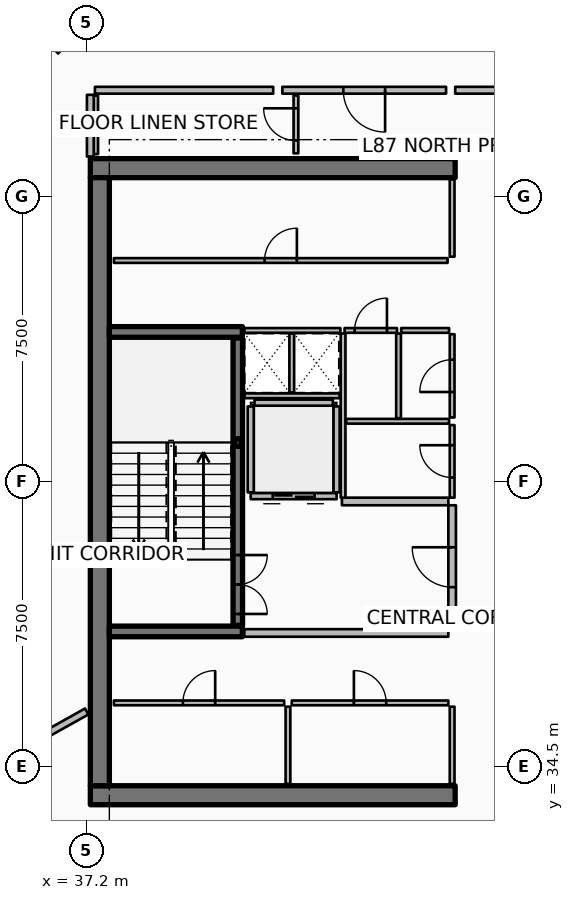
"""IFC4 building model, lengths in metres.
Left out: names, types, materials, properties, quantities, classifications, styles, units other than length and angle.
Written with IfcOpenShell. Run it as: python <this file> out.ifc"""

import sys

from ifc_helpers import new_model, si_unit, direction, frame, frame_2d, origin, origin_2d, place, context, subcontext, project, spatial, rectangle, hollow_rectangle, extrude, element, fill, save


model = new_model("IFC4")
c1 = context("Model", 3, precision=1e-05, world=origin(), true_north=direction((0.0, 1.0)))
c2 = subcontext(c1, "Body", "Model", "MODEL_VIEW")
j1 = project(units=[si_unit("LENGTHUNIT", "METRE"), si_unit("PLANEANGLEUNIT", "RADIAN")], contexts=[c1])
p1 = place(None, origin())
s1 = spatial("IfcSite", under=j1, at=p1, CompositionType="ELEMENT")
p2 = place(p1, origin())
s2 = spatial("IfcBuilding", under=s1, at=p2, CompositionType="ELEMENT")
p3 = place(p2, frame((0.0, 0.0, 347.3)))
s3 = spatial("IfcBuildingStorey", under=s2, at=p3, CompositionType="ELEMENT", Elevation=347.3)
for number, where, z_axis, x_axis in (
    (1, (37.3, 33.75, 0.0), (0.0, 0.0, 1.0), (1.0, 0.0, 0.0)),
    (2, (37.3, 50.25, 0.0), (0.0, 0.0, 1.0), (1.0, 0.0, 0.0)),
):
    element("IfcWall", number, at=place(p3, frame(where, z_axis=z_axis, x_axis=x_axis)), inside=s3, PredefinedType="SHEAR", context=c2, shape_type="SweptSolid", body=[
        extrude(rectangle(XDim=9.6, YDim=0.5, at=frame_2d((4.8, 0.0))), origin(), (0.0, 0.0, 1.0), 4.2),
    ])
p4 = place(p3, frame((37.55, 34.0, 0.0), z_axis=(0.0, 0.0, 1.0), x_axis=(0.0, 1.0, 0.0)))
e3 = element("IfcWall", 3, at=p4, inside=s3, PredefinedType="SHEAR", context=c2, shape_type="SweptSolid", body=[
    extrude(rectangle(XDim=16.0, YDim=0.5, at=frame_2d((8.0, 0.0))), origin(), (0.0, 0.0, 1.0), 4.2),
])
for number, where, z_axis, x_axis in (
    (4, (37.8, 38.06, 0.0), (0.0, 0.0, 1.0), (1.0, 0.0, 0.0)),
    (5, (37.8, 45.94, 0.0), (0.0, 0.0, 1.0), (1.0, 0.0, 0.0)),
):
    element("IfcWall", number, at=place(p3, frame(where, z_axis=z_axis, x_axis=x_axis)), inside=s3, PredefinedType="SHEAR", context=c2, shape_type="SweptSolid", body=[
        extrude(rectangle(XDim=3.5, YDim=0.28, at=frame_2d((1.75, 0.0))), origin(), (0.0, 0.0, 1.0), 4.2),
    ])
p5 = place(p3, frame((41.18, 43.03, 0.0), z_axis=(0.0, 0.0, 1.0), x_axis=(1.0, 0.0, 0.0)))
e6 = element("IfcColumn", 6, at=p5, inside=s3, PredefinedType="COLUMN", context=c2, shape_type="SweptSolid", body=[
    extrude(hollow_rectangle(XDim=0.2, YDim=0.2, WallThickness=0.01, InnerFilletRadius=0.01, OuterFilletRadius=0.02, at=origin_2d()), origin(), (0.0, 0.0, 1.0), 1.895),
])
p6 = place(p3, frame((41.18, 38.22, 0.0), z_axis=(0.0, 0.0, 1.0), x_axis=(0.0, 1.0, 0.0)))
e7 = element("IfcWall", 7, at=p6, inside=s3, PredefinedType="SOLIDWALL", context=c2, shape_type="SweptSolid", body=[
    extrude(rectangle(XDim=7.56, YDim=0.25, at=frame_2d((3.78, 0.0))), origin(), (0.0, 0.0, 1.0), 3.8),
])
p7 = place(p6, frame((0.3, 0.0, 0.0)))
e8 = element("IfcOpeningElement", 8, at=p7, cuts=e7, PredefinedType="OPENING", context=c2, shape_type="SweptSolid", body=[
    extrude(rectangle(XDim=1.55, YDim=2.15, at=frame_2d((0.775, 1.075))), frame((0.0, 0.135, 0.0), z_axis=(0.0, -1.0, 0.0), x_axis=(1.0, 0.0, 0.0)), (0.0, 0.0, 1.0), 0.27),
])
p8 = place(p3, frame((43.78, 41.62, 0.0), z_axis=(0.0, 0.0, 1.0), x_axis=(-1.0, 0.0, 0.0)))
e9 = element("IfcWall", 9, at=p8, inside=s3, PredefinedType="PARTITIONING", context=c2, shape_type="SweptSolid", body=[
    extrude(rectangle(XDim=2.26, YDim=0.16, at=frame_2d((1.13, 0.0))), origin(), (0.0, 0.0, 1.0), 3.8),
])
p9 = place(p8, frame((0.58, 0.0, 0.0)))
e10 = element("IfcOpeningElement", 10, at=p9, cuts=e9, PredefinedType="OPENING", context=c2, shape_type="SweptSolid", body=[
    extrude(rectangle(XDim=1.1, YDim=2.1, at=frame_2d((0.55, 1.05))), frame((0.0, 0.09, 0.0), z_axis=(0.0, -1.0, 0.0), x_axis=(1.0, 0.0, 0.0)), (0.0, 0.0, 1.0), 0.18),
])
for number, where, z_axis, x_axis in (
    (11, (43.78, 41.72, 0.0), (0.0, 0.0, 1.0), (0.0, 1.0, 0.0)),
    (12, (41.52, 41.72, 0.0), (0.0, 0.0, 1.0), (0.0, 1.0, 0.0)),
):
    element("IfcWall", number, at=place(p3, frame(where, z_axis=z_axis, x_axis=x_axis)), inside=s3, PredefinedType="PARTITIONING", context=c2, shape_type="SweptSolid", body=[
        extrude(rectangle(XDim=2.26, YDim=0.16, at=frame_2d((1.13, 0.0))), origin(), (0.0, 0.0, 1.0), 3.8),
    ])
p10 = place(p3, frame((41.62, 44.08, 0.0), z_axis=(0.0, 0.0, 1.0), x_axis=(1.0, 0.0, 0.0)))
e13 = element("IfcWall", 13, at=p10, inside=s3, PredefinedType="PARTITIONING", context=c2, shape_type="SweptSolid", body=[
    extrude(rectangle(XDim=2.06, YDim=0.16, at=frame_2d((1.03, 0.0))), origin(), (0.0, 0.0, 1.0), 3.8),
])
for number, where, z_axis, x_axis in (
    (14, (46.82, 34.05, 0.0), (0.0, 0.0, 1.0), (0.0, 1.0, 0.0)),
    (15, (42.5, 34.05, 0.0), (0.0, 0.0, 1.0), (0.0, 1.0, 0.0)),
):
    element("IfcWall", number, at=place(p3, frame(where, z_axis=z_axis, x_axis=x_axis)), inside=s3, PredefinedType="PARTITIONING", context=c2, shape_type="SweptSolid", body=[
        extrude(rectangle(XDim=2.03, YDim=0.125, at=frame_2d((1.015, 0.0))), origin(), (0.0, 0.0, 1.0), 3.24),
    ])
p11 = place(p3, frame((37.92, 36.18, 0.0), z_axis=(0.0, 0.0, 1.0), x_axis=(1.0, 0.0, 0.0)))
e16 = element("IfcWall", 16, at=p11, inside=s3, PredefinedType="PARTITIONING", context=c2, shape_type="SweptSolid", body=[
    extrude(rectangle(XDim=4.48, YDim=0.125, at=frame_2d((2.24, 0.0))), origin(), (0.0, 0.0, 1.0), 3.24),
])
p12 = place(p11, frame((1.815, 0.0, 0.0)))
e17 = element("IfcOpeningElement", 17, at=p12, cuts=e16, PredefinedType="OPENING", context=c2, shape_type="SweptSolid", body=[
    extrude(rectangle(XDim=0.85, YDim=2.06, at=frame_2d((0.425, 1.03))), frame((0.0, 0.073, 0.0), z_axis=(0.0, -1.0, 0.0), x_axis=(1.0, 0.0, 0.0)), (0.0, 0.0, 1.0), 0.145),
])
p13 = place(p3, frame((42.6, 36.18, 0.0), z_axis=(0.0, 0.0, 1.0), x_axis=(1.0, 0.0, 0.0)))
e18 = element("IfcWall", 18, at=p13, inside=s3, PredefinedType="PARTITIONING", context=c2, shape_type="SweptSolid", body=[
    extrude(rectangle(XDim=4.12, YDim=0.125, at=frame_2d((2.06, 0.0))), origin(), (0.0, 0.0, 1.0), 3.24),
])
p14 = place(p13, frame((1.635, 0.0, 0.0)))
e19 = element("IfcOpeningElement", 19, at=p14, cuts=e18, PredefinedType="OPENING", context=c2, shape_type="SweptSolid", body=[
    extrude(rectangle(XDim=0.85, YDim=2.06, at=frame_2d((0.425, 1.03))), frame((0.0, 0.073, 0.0), z_axis=(0.0, -1.0, 0.0), x_axis=(1.0, 0.0, 0.0)), (0.0, 0.0, 1.0), 0.145),
])
p15 = place(p3, frame((46.82, 47.92, 0.0), z_axis=(0.0, 0.0, 1.0), x_axis=(0.0, 1.0, 0.0)))
e20 = element("IfcWall", 20, at=p15, inside=s3, PredefinedType="PARTITIONING", context=c2, shape_type="SweptSolid", body=[
    extrude(rectangle(XDim=2.03, YDim=0.125, at=frame_2d((1.015, 0.0))), origin(), (0.0, 0.0, 1.0), 3.24),
])
p16 = place(p3, frame((37.92, 47.82, 0.0), z_axis=(0.0, 0.0, 1.0), x_axis=(1.0, 0.0, 0.0)))
e21 = element("IfcWall", 21, at=p16, inside=s3, PredefinedType="PARTITIONING", context=c2, shape_type="SweptSolid", body=[
    extrude(rectangle(XDim=8.78, YDim=0.125, at=frame_2d((4.39, 0.0))), origin(), (0.0, 0.0, 1.0), 3.24),
])
p17 = place(p16, frame((3.965, 0.0, 0.0)))
e22 = element("IfcOpeningElement", 22, at=p17, cuts=e21, PredefinedType="OPENING", context=c2, shape_type="SweptSolid", body=[
    extrude(rectangle(XDim=0.85, YDim=2.06, at=frame_2d((0.425, 1.03))), frame((0.0, 0.073, 0.0), z_axis=(0.0, -1.0, 0.0), x_axis=(1.0, 0.0, 0.0)), (0.0, 0.0, 1.0), 0.145),
])
p18 = place(p3, frame((41.35, 38.02, 0.0), z_axis=(0.0, 0.0, 1.0), x_axis=(1.0, 0.0, 0.0)))
e23 = element("IfcWall", 23, at=p18, inside=s3, PredefinedType="PARTITIONING", context=c2, shape_type="SweptSolid", body=[
    extrude(rectangle(XDim=5.37, YDim=0.2, at=frame_2d((2.685, 0.0))), origin(), (0.0, 0.0, 1.0), 3.8),
])
p19 = place(p3, frame((43.92, 41.48, 0.0), z_axis=(0.0, 0.0, 1.0), x_axis=(1.0, 0.0, 0.0)))
e24 = element("IfcWall", 24, at=p19, inside=s3, PredefinedType="PARTITIONING", context=c2, shape_type="SweptSolid", body=[
    extrude(rectangle(XDim=2.8, YDim=0.2, at=frame_2d((1.4, 0.0))), origin(), (0.0, 0.0, 1.0), 3.8),
])
p20 = place(p3, frame((46.82, 38.12, 0.0), z_axis=(0.0, 0.0, 1.0), x_axis=(0.0, 1.0, 0.0)))
e25 = element("IfcWall", 25, at=p20, inside=s3, PredefinedType="PARTITIONING", context=c2, shape_type="SweptSolid", body=[
    extrude(rectangle(XDim=3.26, YDim=0.2, at=frame_2d((1.63, 0.0))), origin(), (0.0, 0.0, 1.0), 3.8),
])
p21 = place(p20, frame((1.105, 0.0, 0.0)))
e26 = element("IfcOpeningElement", 26, at=p21, cuts=e25, PredefinedType="OPENING", context=c2, shape_type="SweptSolid", body=[
    extrude(rectangle(XDim=1.05, YDim=2.1, at=frame_2d((0.525, 1.05))), frame((0.0, 0.11, 0.0), z_axis=(0.0, -1.0, 0.0), x_axis=(1.0, 0.0, 0.0)), (0.0, 0.0, 1.0), 0.22),
])
p22 = place(p3, frame((41.36, 44.26, 0.0), z_axis=(0.0, 0.0, 1.0), x_axis=(1.0, 0.0, 0.0)))
e27 = element("IfcWall", 27, at=p22, inside=s3, PredefinedType="PARTITIONING", context=c2, shape_type="SweptSolid", body=[
    extrude(rectangle(XDim=2.5, YDim=0.125, at=frame_2d((1.25, 0.0))), origin(), (0.0, 0.0, 1.0), 3.24),
])
p23 = place(p3, frame((42.6, 44.35, 0.0), z_axis=(0.0, 0.0, 1.0), x_axis=(0.0, 1.0, 0.0)))
e28 = element("IfcWall", 28, at=p23, inside=s3, PredefinedType="PARTITIONING", context=c2, shape_type="SweptSolid", body=[
    extrude(rectangle(XDim=1.55, YDim=0.125, at=frame_2d((0.775, 0.0))), origin(), (0.0, 0.0, 1.0), 3.24),
])
p24 = place(p3, frame((43.95, 41.58, 0.0), z_axis=(0.0, 0.0, 1.0), x_axis=(0.0, 1.0, 0.0)))
e29 = element("IfcWall", 29, at=p24, inside=s3, PredefinedType="PARTITIONING", context=c2, shape_type="SweptSolid", body=[
    extrude(rectangle(XDim=4.32, YDim=0.125, at=frame_2d((2.16, 0.0))), origin(), (0.0, 0.0, 1.0), 3.24),
])
p25 = place(p3, frame((44.03, 43.59, 0.0), z_axis=(0.0, 0.0, 1.0), x_axis=(1.0, 0.0, 0.0)))
e30 = element("IfcWall", 30, at=p25, inside=s3, PredefinedType="PARTITIONING", context=c2, shape_type="SweptSolid", body=[
    extrude(rectangle(XDim=2.71, YDim=0.125, at=frame_2d((1.355, 0.0))), origin(), (0.0, 0.0, 1.0), 3.24),
])
p26 = place(p3, frame((45.41, 43.67, 0.0), z_axis=(0.0, 0.0, 1.0), x_axis=(0.0, 1.0, 0.0)))
e31 = element("IfcWall", 31, at=p26, inside=s3, PredefinedType="PARTITIONING", context=c2, shape_type="SweptSolid", body=[
    extrude(rectangle(XDim=2.23, YDim=0.125, at=frame_2d((1.115, 0.0))), origin(), (0.0, 0.0, 1.0), 3.24),
])
p27 = place(p3, frame((46.82, 41.58, 0.0), z_axis=(0.0, 0.0, 1.0), x_axis=(0.0, 1.0, 0.0)))
e32 = element("IfcWall", 32, at=p27, inside=s3, PredefinedType="PARTITIONING", context=c2, shape_type="SweptSolid", body=[
    extrude(rectangle(XDim=1.91, YDim=0.125, at=frame_2d((0.955, 0.0))), origin(), (0.0, 0.0, 1.0), 3.24),
])
p28 = place(p27, frame((0.53, 0.0, 0.0)))
e33 = element("IfcOpeningElement", 33, at=p28, cuts=e32, PredefinedType="OPENING", context=c2, shape_type="SweptSolid", body=[
    extrude(rectangle(XDim=0.85, YDim=2.06, at=frame_2d((0.425, 1.03))), frame((0.0, 0.073, 0.0), z_axis=(0.0, -1.0, 0.0), x_axis=(1.0, 0.0, 0.0)), (0.0, 0.0, 1.0), 0.145),
])
p29 = place(p3, frame((46.82, 43.69, 0.0), z_axis=(0.0, 0.0, 1.0), x_axis=(0.0, 1.0, 0.0)))
e34 = element("IfcWall", 34, at=p29, inside=s3, PredefinedType="PARTITIONING", context=c2, shape_type="SweptSolid", body=[
    extrude(rectangle(XDim=2.19, YDim=0.125, at=frame_2d((1.095, 0.0))), origin(), (0.0, 0.0, 1.0), 3.24),
])
p30 = place(p29, frame((0.67, 0.0, 0.0)))
e35 = element("IfcOpeningElement", 35, at=p30, cuts=e34, PredefinedType="OPENING", context=c2, shape_type="SweptSolid", body=[
    extrude(rectangle(XDim=0.85, YDim=2.06, at=frame_2d((0.425, 1.03))), frame((0.0, 0.073, 0.0), z_axis=(0.0, -1.0, 0.0), x_axis=(1.0, 0.0, 0.0)), (0.0, 0.0, 1.0), 0.145),
])
p31 = place(p3, frame((41.35, 45.98, 0.0), z_axis=(0.0, 0.0, 1.0), x_axis=(1.0, 0.0, 0.0)))
e36 = element("IfcWall", 36, at=p31, inside=s3, PredefinedType="PARTITIONING", context=c2, shape_type="SweptSolid", body=[
    extrude(rectangle(XDim=2.53, YDim=0.125, at=frame_2d((1.265, 0.0))), origin(), (0.0, 0.0, 1.0), 3.24),
])
p32 = place(p3, frame((43.99, 45.98, 0.0), z_axis=(0.0, 0.0, 1.0), x_axis=(1.0, 0.0, 0.0)))
e37 = element("IfcWall", 37, at=p32, inside=s3, PredefinedType="PARTITIONING", context=c2, shape_type="SweptSolid", body=[
    extrude(rectangle(XDim=1.38, YDim=0.125, at=frame_2d((0.69, 0.0))), origin(), (0.0, 0.0, 1.0), 3.24),
])
p33 = place(p32, frame((0.265, 0.0, 0.0)))
e38 = element("IfcOpeningElement", 38, at=p33, cuts=e37, PredefinedType="OPENING", context=c2, shape_type="SweptSolid", body=[
    extrude(rectangle(XDim=0.85, YDim=2.06, at=frame_2d((0.425, 1.03))), frame((0.0, 0.073, 0.0), z_axis=(0.0, -1.0, 0.0), x_axis=(1.0, 0.0, 0.0)), (0.0, 0.0, 1.0), 0.145),
])
p34 = place(p3, frame((45.48, 45.98, 0.0), z_axis=(0.0, 0.0, 1.0), x_axis=(1.0, 0.0, 0.0)))
e39 = element("IfcWall", 39, at=p34, inside=s3, PredefinedType="PARTITIONING", context=c2, shape_type="SweptSolid", body=[
    extrude(rectangle(XDim=1.26, YDim=0.125, at=frame_2d((0.63, 0.0))), origin(), (0.0, 0.0, 1.0), 3.24),
])
p35 = place(p3, frame((37.44, 50.62, 0.0), z_axis=(0.0, 0.0, 1.0), x_axis=(0.0, 1.0, 0.0)))
e40 = element("IfcWall", 40, at=p35, inside=s3, PredefinedType="PARTITIONING", context=c2, shape_type="SweptSolid", body=[
    extrude(rectangle(XDim=1.54, YDim=0.125, at=frame_2d((0.77, 0.0))), origin(), (0.0, 0.0, 1.0), 2.757),
])
p36 = place(p3, frame((42.71, 50.64, 0.0), z_axis=(0.0, 0.0, 1.0), x_axis=(0.0, 1.0, 0.0)))
e41 = element("IfcWall", 41, at=p36, inside=s3, PredefinedType="PARTITIONING", context=c2, shape_type="SweptSolid", body=[
    extrude(rectangle(XDim=1.52, YDim=0.125, at=frame_2d((0.76, 0.0))), origin(), (0.0, 0.0, 1.0), 2.757),
])
p37 = place(p36, frame((0.335, 0.0, 0.0)))
e42 = element("IfcOpeningElement", 42, at=p37, cuts=e41, PredefinedType="OPENING", context=c2, shape_type="SweptSolid", body=[
    extrude(rectangle(XDim=0.85, YDim=2.06, at=frame_2d((0.425, 1.03))), frame((0.0, 0.073, 0.0), z_axis=(0.0, -1.0, 0.0), x_axis=(1.0, 0.0, 0.0)), (0.0, 0.0, 1.0), 0.145),
])
p38 = place(p3, frame((37.204, 35.954, 0.0), z_axis=(0.0, 0.0, 1.0), x_axis=(-0.872495191914, -0.488622697064, 0.0)))
e43 = element("IfcWall", 43, at=p38, inside=s3, PredefinedType="PARTITIONING", context=c2, shape_type="SweptSolid", body=[
    extrude(rectangle(XDim=13.462, YDim=0.18, at=frame_2d((6.731, 0.0))), origin(), (0.0, 0.0, 1.0), 2.757),
])
p39 = place(p3, frame((46.661, 52.3, 0.0), z_axis=(0.0, 0.0, 1.0), x_axis=(-1.0, 0.0, 0.0)))
e44 = element("IfcWall", 44, at=p39, inside=s3, PredefinedType="PARTITIONING", context=c2, shape_type="SweptSolid", body=[
    extrude(rectangle(XDim=4.309, YDim=0.18, at=frame_2d((2.155, 0.0))), origin(), (0.0, 0.0, 1.0), 2.757),
])
p40 = place(p39, frame((1.604, 0.0, 0.0)))
e45 = element("IfcOpeningElement", 45, at=p40, cuts=e44, PredefinedType="OPENING", context=c2, shape_type="SweptSolid", body=[
    extrude(rectangle(XDim=1.1, YDim=2.1, at=frame_2d((0.55, 1.05))), frame((0.0, 0.1, 0.0), z_axis=(0.0, -1.0, 0.0), x_axis=(1.0, 0.0, 0.0)), (0.0, 0.0, 1.0), 0.2),
])
p41 = place(p3, frame((50.785, 52.3, 0.0), z_axis=(0.0, 0.0, 1.0), x_axis=(-1.0, 0.0, 0.0)))
e46 = element("IfcWall", 46, at=p41, inside=s3, PredefinedType="PARTITIONING", context=c2, shape_type="SweptSolid", body=[
    extrude(rectangle(XDim=3.884, YDim=0.18, at=frame_2d((1.942, 0.0))), origin(), (0.0, 0.0, 1.0), 2.757),
])
p42 = place(p3, frame((42.112, 52.3, 0.0), z_axis=(0.0, 0.0, 1.0), x_axis=(-1.0, 0.0, 0.0)))
e47 = element("IfcWall", 47, at=p42, inside=s3, PredefinedType="PARTITIONING", context=c2, shape_type="SweptSolid", body=[
    extrude(rectangle(XDim=4.692, YDim=0.18, at=frame_2d((2.346, 0.0))), origin(), (0.0, 0.0, 1.0), 2.757),
])
p43 = place(p3, frame((37.3, 52.18, 0.0), z_axis=(0.0, 0.0, 1.0), x_axis=(0.0, -1.0, 0.0)))
e48 = element("IfcWall", 48, at=p43, inside=s3, PredefinedType="PARTITIONING", context=c2, shape_type="SweptSolid", body=[
    extrude(rectangle(XDim=1.625, YDim=0.18, at=frame_2d((0.812, 0.0))), origin(), (0.0, 0.0, 1.0), 2.757),
])
p44 = place(p3, frame((37.728, 55.735, 0.0), z_axis=(0.0, 0.0, 1.0), x_axis=(-0.717843655189, -0.696204342636, 0.0)))
e49 = element("IfcWall", 49, at=p44, inside=s3, PredefinedType="PARTITIONING", context=c2, shape_type="SweptSolid", body=[
    extrude(rectangle(XDim=4.366, YDim=0.125, at=frame_2d((2.183, 0.0))), origin(), (0.0, 0.0, 1.0), 2.757),
])
p45 = place(p44, frame((1.733, 0.0, 0.0)))
e50 = element("IfcOpeningElement", 50, at=p45, cuts=e49, PredefinedType="OPENING", context=c2, shape_type="SweptSolid", body=[
    extrude(rectangle(XDim=0.9, YDim=2.08, at=frame_2d((0.45, 1.04))), frame((0.0, 0.073, 0.0), z_axis=(0.0, -1.0, 0.0), x_axis=(1.0, 0.0, 0.0)), (0.0, 0.0, 1.0), 0.145),
])
p46 = place(p7, origin())
e51 = element("IfcDoor", 51, at=p46, inside=s3, OperationType="DOUBLE_DOOR_SINGLE_SWING", PredefinedType="DOOR", context=c2, shape_type="SweptSolid", body=[
    extrude(rectangle(XDim=1.55, YDim=2.15, at=frame_2d((0.775, 1.075))), frame((0.0, 0.025, 0.0), z_axis=(0.0, -1.0, 0.0), x_axis=(1.0, 0.0, 0.0)), (0.0, 0.0, 1.0), 0.05),
])
fill(e8, e51)
p47 = place(p9, origin())
e52 = element("IfcDoor", 52, at=p47, inside=s3, OperationType="DOUBLE_DOOR_SLIDING", PredefinedType="DOOR", context=c2, shape_type="SweptSolid", body=[
    extrude(rectangle(XDim=1.1, YDim=2.1, at=frame_2d((0.55, 1.05))), frame((0.0, 0.025, 0.0), z_axis=(0.0, -1.0, 0.0), x_axis=(1.0, 0.0, 0.0)), (0.0, 0.0, 1.0), 0.05),
])
fill(e10, e52)
p48 = place(p12, origin())
e53 = element("IfcDoor", 53, at=p48, inside=s3, OperationType="SINGLE_SWING_RIGHT", PredefinedType="DOOR", context=c2, shape_type="SweptSolid", body=[
    extrude(rectangle(XDim=0.85, YDim=2.06, at=frame_2d((0.425, 1.03))), frame((0.0, 0.025, 0.0), z_axis=(0.0, -1.0, 0.0), x_axis=(1.0, 0.0, 0.0)), (0.0, 0.0, 1.0), 0.05),
])
fill(e17, e53)
p49 = place(p14, origin())
e54 = element("IfcDoor", 54, at=p49, inside=s3, OperationType="SINGLE_SWING_LEFT", PredefinedType="DOOR", context=c2, shape_type="SweptSolid", body=[
    extrude(rectangle(XDim=0.85, YDim=2.06, at=frame_2d((0.425, 1.03))), frame((0.0, 0.025, 0.0), z_axis=(0.0, -1.0, 0.0), x_axis=(1.0, 0.0, 0.0)), (0.0, 0.0, 1.0), 0.05),
])
fill(e19, e54)
p50 = place(p17, origin())
e55 = element("IfcDoor", 55, at=p50, inside=s3, OperationType="SINGLE_SWING_RIGHT", PredefinedType="DOOR", context=c2, shape_type="SweptSolid", body=[
    extrude(rectangle(XDim=0.85, YDim=2.06, at=frame_2d((0.425, 1.03))), frame((0.0, 0.025, 0.0), z_axis=(0.0, -1.0, 0.0), x_axis=(1.0, 0.0, 0.0)), (0.0, 0.0, 1.0), 0.05),
])
fill(e22, e55)
p51 = place(p21, origin())
e56 = element("IfcDoor", 56, at=p51, inside=s3, OperationType="SINGLE_SWING_RIGHT", PredefinedType="DOOR", context=c2, shape_type="SweptSolid", body=[
    extrude(rectangle(XDim=1.05, YDim=2.1, at=frame_2d((0.525, 1.05))), frame((0.0, 0.025, 0.0), z_axis=(0.0, -1.0, 0.0), x_axis=(1.0, 0.0, 0.0)), (0.0, 0.0, 1.0), 0.05),
])
fill(e26, e56)
p52 = place(p28, origin())
e57 = element("IfcDoor", 57, at=p52, inside=s3, OperationType="SINGLE_SWING_RIGHT", PredefinedType="DOOR", context=c2, shape_type="SweptSolid", body=[
    extrude(rectangle(XDim=0.85, YDim=2.06, at=frame_2d((0.425, 1.03))), frame((0.0, 0.025, 0.0), z_axis=(0.0, -1.0, 0.0), x_axis=(1.0, 0.0, 0.0)), (0.0, 0.0, 1.0), 0.05),
])
fill(e33, e57)
p53 = place(p30, origin())
e58 = element("IfcDoor", 58, at=p53, inside=s3, OperationType="SINGLE_SWING_LEFT", PredefinedType="DOOR", context=c2, shape_type="SweptSolid", body=[
    extrude(rectangle(XDim=0.85, YDim=2.06, at=frame_2d((0.425, 1.03))), frame((0.0, 0.025, 0.0), z_axis=(0.0, -1.0, 0.0), x_axis=(1.0, 0.0, 0.0)), (0.0, 0.0, 1.0), 0.05),
])
fill(e35, e58)
p54 = place(p33, origin())
e59 = element("IfcDoor", 59, at=p54, inside=s3, OperationType="SINGLE_SWING_RIGHT", PredefinedType="DOOR", context=c2, shape_type="SweptSolid", body=[
    extrude(rectangle(XDim=0.85, YDim=2.06, at=frame_2d((0.425, 1.03))), frame((0.0, 0.025, 0.0), z_axis=(0.0, -1.0, 0.0), x_axis=(1.0, 0.0, 0.0)), (0.0, 0.0, 1.0), 0.05),
])
fill(e38, e59)
p55 = place(p37, origin())
e60 = element("IfcDoor", 60, at=p55, inside=s3, OperationType="SINGLE_SWING_RIGHT", PredefinedType="DOOR", context=c2, shape_type="SweptSolid", body=[
    extrude(rectangle(XDim=0.85, YDim=2.06, at=frame_2d((0.425, 1.03))), frame((0.0, 0.025, 0.0), z_axis=(0.0, -1.0, 0.0), x_axis=(1.0, 0.0, 0.0)), (0.0, 0.0, 1.0), 0.05),
])
fill(e42, e60)
p56 = place(p40, origin())
e61 = element("IfcDoor", 61, at=p56, inside=s3, OperationType="SINGLE_SWING_LEFT", PredefinedType="DOOR", context=c2, shape_type="SweptSolid", body=[
    extrude(rectangle(XDim=1.1, YDim=2.1, at=frame_2d((0.55, 1.05))), frame((0.0, 0.025, 0.0), z_axis=(0.0, -1.0, 0.0), x_axis=(1.0, 0.0, 0.0)), (0.0, 0.0, 1.0), 0.05),
])
fill(e45, e61)
save(model, sys.argv[1])
